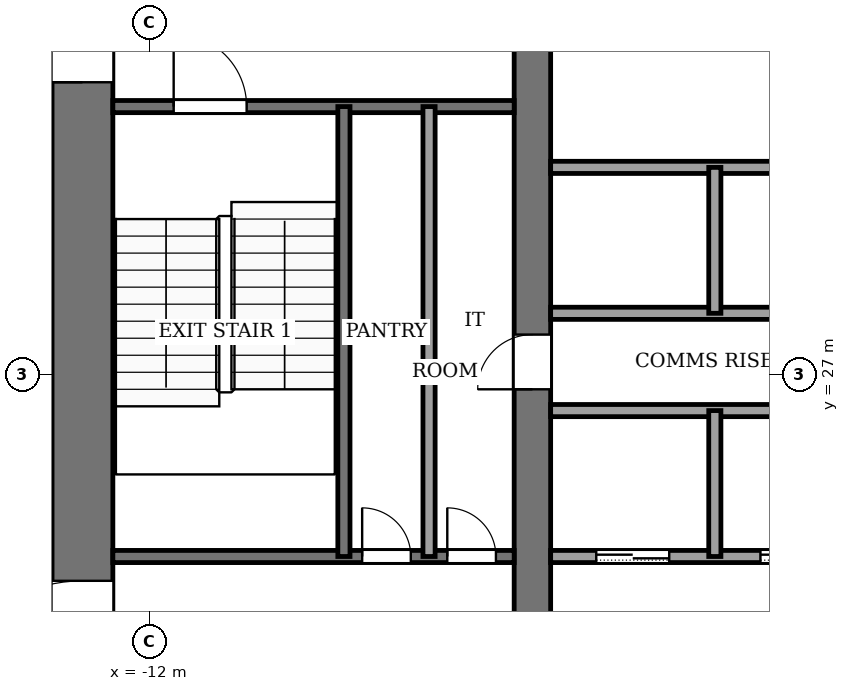
"""IFC4 building model, lengths in metres.
Left out: names, types, materials, properties, quantities, classifications, styles, units other than length and angle.
Written with IfcOpenShell. Run it as: python <this file> out.ifc"""

import sys

from ifc_helpers import new_model, si_unit, direction, frame, frame_2d, origin, place, context, subcontext, project, spatial, rectangle, extrude, element, fill, save


model = new_model("IFC4")
c1 = context("Model", 3, precision=1e-05, world=origin(), true_north=direction((0.0, 1.0)))
c2 = subcontext(c1, "Body", "Model", "MODEL_VIEW")
j1 = project(units=[si_unit("LENGTHUNIT", "METRE"), si_unit("PLANEANGLEUNIT", "RADIAN")], contexts=[c1])
p1 = place(None, origin())
s1 = spatial("IfcSite", under=j1, at=p1, CompositionType="ELEMENT")
p2 = place(p1, origin())
s2 = spatial("IfcBuilding", under=s1, at=p2, CompositionType="ELEMENT")
p3 = place(p2, frame((0.0, 0.0, 146.0)))
s3 = spatial("IfcBuildingStorey", under=s2, at=p3, CompositionType="ELEMENT", Elevation=146.0)
p4 = place(p3, frame((-13.1, 18.4, -0.13), z_axis=(0.0, 0.0, 1.0), x_axis=(0.0, 1.0, 0.0)))
e1 = element("IfcWall", 1, at=p4, inside=s3, PredefinedType="SHEAR", context=c2, shape_type="SweptSolid", body=[
    extrude(rectangle(XDim=19.2, YDim=1.0, at=frame_2d((9.6, 0.0))), origin(), (0.0, 0.0, 1.0), 4.0),
])
p5 = place(p4, frame((2.8, 0.0, 0.13)))
e2 = element("IfcOpeningElement", 2, at=p5, cuts=e1, PredefinedType="OPENING", context=c2, shape_type="SweptSolid", body=[
    extrude(rectangle(XDim=2.4, YDim=2.4, at=frame_2d((1.2, 1.2))), frame((0.0, 0.51, 0.0), z_axis=(0.0, -1.0, 0.0), x_axis=(1.0, 0.0, 0.0)), (0.0, 0.0, 1.0), 1.02),
])
p6 = place(p4, frame((13.4, 0.0, 0.13)))
e3 = element("IfcOpeningElement", 3, at=p6, cuts=e1, PredefinedType="OPENING", context=c2, shape_type="SweptSolid", body=[
    extrude(rectangle(XDim=1.4, YDim=2.2, at=frame_2d((0.7, 1.1))), frame((0.0, 0.51, 0.0), z_axis=(0.0, -1.0, 0.0), x_axis=(1.0, 0.0, 0.0)), (0.0, 0.0, 1.0), 1.02),
])
p7 = place(p3, frame((-5.7, 18.4, -0.13), z_axis=(0.0, 0.0, 1.0), x_axis=(0.0, 1.0, 0.0)))
e4 = element("IfcWall", 4, at=p7, inside=s3, PredefinedType="SHEAR", context=c2, shape_type="SweptSolid", body=[
    extrude(rectangle(XDim=19.2, YDim=0.6, at=frame_2d((9.6, 0.0))), origin(), (0.0, 0.0, 1.0), 4.0),
])
p8 = place(p7, frame((8.35, 0.0, 0.13)))
e5 = element("IfcOpeningElement", 5, at=p8, cuts=e4, PredefinedType="OPENING", context=c2, shape_type="SweptSolid", body=[
    extrude(rectangle(XDim=0.9, YDim=2.1, at=frame_2d((0.45, 1.05))), frame((0.0, 0.31, 0.0), z_axis=(0.0, -1.0, 0.0), x_axis=(1.0, 0.0, 0.0)), (0.0, 0.0, 1.0), 0.62),
])
p9 = place(p3, frame((-12.6, 24.0, 0.0), z_axis=(0.0, 0.0, 1.0), x_axis=(1.0, 0.0, 0.0)))
e6 = element("IfcWall", 6, at=p9, inside=s3, PredefinedType="PARTITIONING", context=c2, shape_type="SweptSolid", body=[
    extrude(rectangle(XDim=6.6, YDim=0.2, at=frame_2d((3.3, 0.0))), origin(), (0.0, 0.0, 1.0), 3.87),
])
p10 = place(p9, frame((4.1, 0.0, 0.0)))
e7 = element("IfcOpeningElement", 7, at=p10, cuts=e6, PredefinedType="OPENING", context=c2, shape_type="SweptSolid", body=[
    extrude(rectangle(XDim=0.8, YDim=2.1, at=frame_2d((0.4, 1.05))), frame((0.0, 0.11, 0.0), z_axis=(0.0, -1.0, 0.0), x_axis=(1.0, 0.0, 0.0)), (0.0, 0.0, 1.0), 0.22),
])
p11 = place(p9, frame((5.5, 0.0, 0.0)))
e8 = element("IfcOpeningElement", 8, at=p11, cuts=e6, PredefinedType="OPENING", context=c2, shape_type="SweptSolid", body=[
    extrude(rectangle(XDim=0.8, YDim=2.1, at=frame_2d((0.4, 1.05))), frame((0.0, 0.11, 0.0), z_axis=(0.0, -1.0, 0.0), x_axis=(1.0, 0.0, 0.0)), (0.0, 0.0, 1.0), 0.22),
])
p12 = place(p3, frame((-5.4, 24.0, 0.0), z_axis=(0.0, 0.0, 1.0), x_axis=(1.0, 0.0, 0.0)))
e9 = element("IfcWall", 9, at=p12, inside=s3, PredefinedType="PARTITIONING", context=c2, shape_type="SweptSolid", body=[
    extrude(rectangle(XDim=10.8, YDim=0.2, at=frame_2d((5.4, 0.0))), origin(), (0.0, 0.0, 1.0), 3.87),
])
p13 = place(p12, frame((0.75, 0.0, 0.0)))
e10 = element("IfcOpeningElement", 10, at=p13, cuts=e9, PredefinedType="OPENING", context=c2, shape_type="SweptSolid", body=[
    extrude(rectangle(XDim=1.2, YDim=2.2, at=frame_2d((0.6, 1.1))), frame((0.0, 0.11, 0.0), z_axis=(0.0, -1.0, 0.0), x_axis=(1.0, 0.0, 0.0)), (0.0, 0.0, 1.0), 0.22),
])
p14 = place(p12, frame((3.45, 0.0, 0.0)))
e11 = element("IfcOpeningElement", 11, at=p14, cuts=e9, PredefinedType="OPENING", context=c2, shape_type="SweptSolid", body=[
    extrude(rectangle(XDim=1.2, YDim=2.2, at=frame_2d((0.6, 1.1))), frame((0.0, 0.11, 0.0), z_axis=(0.0, -1.0, 0.0), x_axis=(1.0, 0.0, 0.0)), (0.0, 0.0, 1.0), 0.22),
])
p15 = place(p12, frame((6.15, 0.0, 0.0)))
e12 = element("IfcOpeningElement", 12, at=p15, cuts=e9, PredefinedType="OPENING", context=c2, shape_type="SweptSolid", body=[
    extrude(rectangle(XDim=1.2, YDim=2.2, at=frame_2d((0.6, 1.1))), frame((0.0, 0.11, 0.0), z_axis=(0.0, -1.0, 0.0), x_axis=(1.0, 0.0, 0.0)), (0.0, 0.0, 1.0), 0.22),
])
p16 = place(p12, frame((8.85, 0.0, 0.0)))
e13 = element("IfcOpeningElement", 13, at=p16, cuts=e9, PredefinedType="OPENING", context=c2, shape_type="SweptSolid", body=[
    extrude(rectangle(XDim=1.2, YDim=2.2, at=frame_2d((0.6, 1.1))), frame((0.0, 0.11, 0.0), z_axis=(0.0, -1.0, 0.0), x_axis=(1.0, 0.0, 0.0)), (0.0, 0.0, 1.0), 0.22),
])
for number, where, z_axis, x_axis in (
    (14, (-5.4, 26.4, 0.0), (0.0, 0.0, 1.0), (1.0, 0.0, 0.0)),
    (15, (-5.4, 28.0, 0.0), (0.0, 0.0, 1.0), (1.0, 0.0, 0.0)),
    (16, (-5.4, 30.4, 0.0), (0.0, 0.0, 1.0), (1.0, 0.0, 0.0)),
):
    element("IfcWall", number, at=place(p3, frame(where, z_axis=z_axis, x_axis=x_axis)), inside=s3, PredefinedType="PARTITIONING", context=c2, shape_type="SweptSolid", body=[
        extrude(rectangle(XDim=10.8, YDim=0.2, at=frame_2d((5.4, 0.0))), origin(), (0.0, 0.0, 1.0), 3.87),
    ])
p17 = place(p3, frame((-12.6, 31.4, 0.0), z_axis=(0.0, 0.0, 1.0), x_axis=(1.0, 0.0, 0.0)))
e17 = element("IfcWall", 17, at=p17, inside=s3, PredefinedType="PARTITIONING", context=c2, shape_type="SweptSolid", body=[
    extrude(rectangle(XDim=6.6, YDim=0.2, at=frame_2d((3.3, 0.0))), origin(), (0.0, 0.0, 1.0), 3.87),
])
p18 = place(p17, frame((1.0, 0.0, 0.0)))
e18 = element("IfcOpeningElement", 18, at=p18, cuts=e17, PredefinedType="OPENING", context=c2, shape_type="SweptSolid", body=[
    extrude(rectangle(XDim=1.2, YDim=2.2, at=frame_2d((0.6, 1.1))), frame((0.0, 0.11, 0.0), z_axis=(0.0, -1.0, 0.0), x_axis=(1.0, 0.0, 0.0)), (0.0, 0.0, 1.0), 0.22),
])
for number, where, z_axis, x_axis in (
    (19, (-8.8, 24.0, 0.0), (0.0, 0.0, 1.0), (0.0, 1.0, 0.0)),
    (20, (-7.4, 24.0, 0.0), (0.0, 0.0, 1.0), (0.0, 1.0, 0.0)),
):
    element("IfcWall", number, at=place(p3, frame(where, z_axis=z_axis, x_axis=x_axis)), inside=s3, PredefinedType="PARTITIONING", context=c2, shape_type="SweptSolid", body=[
        extrude(rectangle(XDim=7.4, YDim=0.2, at=frame_2d((3.7, 0.0))), origin(), (0.0, 0.0, 1.0), 3.87),
    ])
for number, where, z_axis, x_axis in (
    (21, (-2.7, 24.0, 0.0), (0.0, 0.0, 1.0), (0.0, 1.0, 0.0)),
    (22, (-2.7, 28.0, 0.0), (0.0, 0.0, 1.0), (0.0, 1.0, 0.0)),
):
    element("IfcWall", number, at=place(p3, frame(where, z_axis=z_axis, x_axis=x_axis)), inside=s3, PredefinedType="PARTITIONING", context=c2, shape_type="SweptSolid", body=[
        extrude(rectangle(XDim=2.4, YDim=0.2, at=frame_2d((1.2, 0.0))), origin(), (0.0, 0.0, 1.0), 3.87),
    ])
p19 = place(p13, origin())
e23 = element("IfcDoor", 23, at=p19, inside=s3, OperationType="SLIDING_TO_LEFT", PredefinedType="DOOR", context=c2, shape_type="SweptSolid", body=[
    extrude(rectangle(XDim=1.2, YDim=2.2, at=frame_2d((0.6, 1.1))), frame((0.0, 0.025, 0.0), z_axis=(0.0, -1.0, 0.0), x_axis=(1.0, 0.0, 0.0)), (0.0, 0.0, 1.0), 0.05),
])
fill(e10, e23)
p20 = place(p14, origin())
e24 = element("IfcDoor", 24, at=p20, inside=s3, OperationType="SLIDING_TO_LEFT", PredefinedType="DOOR", context=c2, shape_type="SweptSolid", body=[
    extrude(rectangle(XDim=1.2, YDim=2.2, at=frame_2d((0.6, 1.1))), frame((0.0, 0.025, 0.0), z_axis=(0.0, -1.0, 0.0), x_axis=(1.0, 0.0, 0.0)), (0.0, 0.0, 1.0), 0.05),
])
fill(e11, e24)
p21 = place(p10, origin())
e25 = element("IfcDoor", 25, at=p21, inside=s3, OperationType="SINGLE_SWING_RIGHT", PredefinedType="DOOR", context=c2, shape_type="SweptSolid", body=[
    extrude(rectangle(XDim=0.8, YDim=2.1, at=frame_2d((0.4, 1.05))), frame((0.0, 0.025, 0.0), z_axis=(0.0, -1.0, 0.0), x_axis=(1.0, 0.0, 0.0)), (0.0, 0.0, 1.0), 0.05),
])
fill(e7, e25)
p22 = place(p11, origin())
e26 = element("IfcDoor", 26, at=p22, inside=s3, OperationType="SINGLE_SWING_LEFT", PredefinedType="DOOR", context=c2, shape_type="SweptSolid", body=[
    extrude(rectangle(XDim=0.8, YDim=2.1, at=frame_2d((0.4, 1.05))), frame((0.0, 0.025, 0.0), z_axis=(0.0, -1.0, 0.0), x_axis=(1.0, 0.0, 0.0)), (0.0, 0.0, 1.0), 0.05),
])
fill(e8, e26)
p23 = place(p8, origin())
e27 = element("IfcDoor", 27, at=p23, inside=s3, OperationType="SINGLE_SWING_LEFT", PredefinedType="DOOR", context=c2, shape_type="SweptSolid", body=[
    extrude(rectangle(XDim=0.9, YDim=2.1, at=frame_2d((0.45, 1.05))), frame((0.0, 0.025, 0.0), z_axis=(0.0, -1.0, 0.0), x_axis=(1.0, 0.0, 0.0)), (0.0, 0.0, 1.0), 0.05),
])
fill(e5, e27)
p24 = place(p18, origin())
e28 = element("IfcDoor", 28, at=p24, inside=s3, OperationType="SINGLE_SWING_RIGHT", PredefinedType="DOOR", context=c2, shape_type="SweptSolid", body=[
    extrude(rectangle(XDim=1.2, YDim=2.2, at=frame_2d((0.6, 1.1))), frame((0.0, 0.025, 0.0), z_axis=(0.0, -1.0, 0.0), x_axis=(1.0, 0.0, 0.0)), (0.0, 0.0, 1.0), 0.05),
])
fill(e18, e28)
p25 = place(p5, origin())
e29 = element("IfcDoor", 29, at=p25, inside=s3, OperationType="DOUBLE_DOOR_SINGLE_SWING", PredefinedType="DOOR", context=c2, shape_type="SweptSolid", body=[
    extrude(rectangle(XDim=2.4, YDim=2.4, at=frame_2d((1.2, 1.2))), frame((0.0, 0.025, 0.0), z_axis=(0.0, -1.0, 0.0), x_axis=(1.0, 0.0, 0.0)), (0.0, 0.0, 1.0), 0.05),
])
fill(e2, e29)
p26 = place(p6, origin())
e30 = element("IfcDoor", 30, at=p26, inside=s3, OperationType="SINGLE_SWING_RIGHT", PredefinedType="DOOR", context=c2, shape_type="SweptSolid", body=[
    extrude(rectangle(XDim=1.4, YDim=2.2, at=frame_2d((0.7, 1.1))), frame((0.0, 0.025, 0.0), z_axis=(0.0, -1.0, 0.0), x_axis=(1.0, 0.0, 0.0)), (0.0, 0.0, 1.0), 0.05),
])
fill(e3, e30)
save(model, sys.argv[1])
